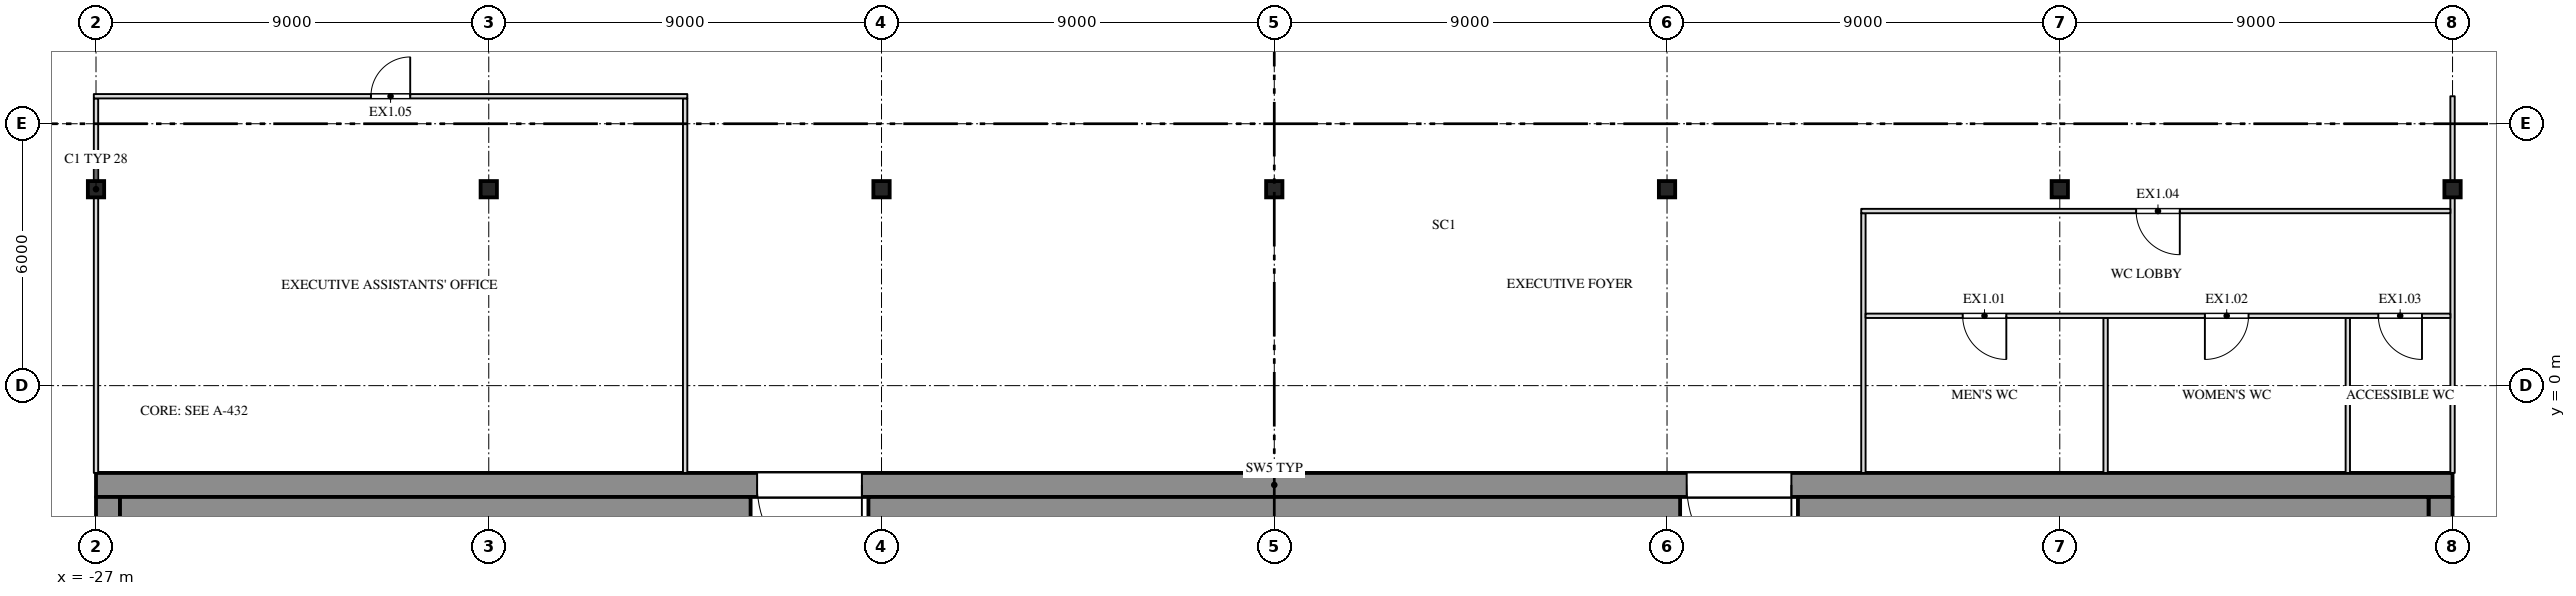
"""IFC4 building model, lengths in metres.
Left out: names, types, materials, properties, quantities, classifications, styles, units other than length and angle.
Written with IfcOpenShell. Run it as: python <this file> out.ifc"""

import sys

from ifc_helpers import new_model, si_unit, direction, frame, frame_2d, origin, origin_2d, place, context, subcontext, project, spatial, rectangle, i_section, extrude, element, fill, save


model = new_model("IFC4")
c1 = context("Model", 3, precision=1e-05, world=origin(), true_north=direction((0.0, 1.0)))
c2 = subcontext(c1, "Body", "Model", "MODEL_VIEW")
j1 = project(units=[si_unit("LENGTHUNIT", "METRE"), si_unit("PLANEANGLEUNIT", "RADIAN")], contexts=[c1])
p1 = place(None, origin())
s1 = spatial("IfcSite", under=j1, at=p1, CompositionType="ELEMENT")
p2 = place(p1, origin())
s2 = spatial("IfcBuilding", under=s1, at=p2, CompositionType="ELEMENT")
p3 = place(p2, frame((0.0, 0.0, 272.5)))
s3 = spatial("IfcBuildingStorey", under=s2, at=p3, CompositionType="ELEMENT", Elevation=272.5)
for number, where, z_axis, x_axis in (
    (1, (-27.0, 4.5, 0.0), (0.0, 0.0, 1.0), (1.0, 0.0, 0.0)),
    (2, (-18.0, 4.5, 0.0), (0.0, 0.0, 1.0), (1.0, 0.0, 0.0)),
    (3, (-9.0, 4.5, 0.0), (0.0, 0.0, 1.0), (1.0, 0.0, 0.0)),
    (4, (0.0, 4.5, 0.0), (0.0, 0.0, 1.0), (1.0, 0.0, 0.0)),
    (5, (9.0, 4.5, 0.0), (0.0, 0.0, 1.0), (1.0, 0.0, 0.0)),
    (6, (18.0, 4.5, 0.0), (0.0, 0.0, 1.0), (1.0, 0.0, 0.0)),
    (7, (27.0, 4.5, 0.0), (0.0, 0.0, 1.0), (1.0, 0.0, 0.0)),
):
    element("IfcColumn", number, at=place(p3, frame(where, z_axis=z_axis, x_axis=x_axis)), inside=s3, PredefinedType="COLUMN", context=c2, shape_type="SweptSolid", body=[
        extrude(i_section(OverallWidth=0.373, OverallDepth=0.373, WebThickness=0.016, FlangeThickness=0.026, at=origin_2d()), origin(), (0.0, 0.0, 1.0), 4.0),
    ])
p4 = place(p3, frame((-27.0, -2.275, 0.0), z_axis=(0.0, 0.0, 1.0), x_axis=(1.0, 0.0, 0.0)))
e8 = element("IfcWall", 8, at=p4, inside=s3, PredefinedType="SHEAR", context=c2, shape_type="SweptSolid", body=[
    extrude(rectangle(XDim=54.0, YDim=0.55, at=frame_2d((27.0, 0.0))), origin(), (0.0, 0.0, 1.0), 3.78),
])
p5 = place(p4, frame((15.15, 0.0, 0.0)))
e9 = element("IfcOpeningElement", 9, at=p5, cuts=e8, PredefinedType="OPENING", context=c2, shape_type="SweptSolid", body=[
    extrude(rectangle(XDim=2.4, YDim=2.1, at=frame_2d((1.2, 1.05))), frame((0.0, 0.287, 0.0), z_axis=(0.0, -1.0, 0.0), x_axis=(1.0, 0.0, 0.0)), (0.0, 0.0, 1.0), 0.574),
])
p6 = place(p4, frame((36.45, 0.0, 0.0)))
e10 = element("IfcOpeningElement", 10, at=p6, cuts=e8, PredefinedType="OPENING", context=c2, shape_type="SweptSolid", body=[
    extrude(rectangle(XDim=2.4, YDim=2.1, at=frame_2d((1.2, 1.05))), frame((0.0, 0.287, 0.0), z_axis=(0.0, -1.0, 0.0), x_axis=(1.0, 0.0, 0.0)), (0.0, 0.0, 1.0), 0.574),
])
p7 = place(p3, frame((-26.725, -13.45, 0.0), z_axis=(0.0, 0.0, 1.0), x_axis=(0.0, 1.0, 0.0)))
e11 = element("IfcWall", 11, at=p7, inside=s3, PredefinedType="SHEAR", context=c2, shape_type="SweptSolid", body=[
    extrude(rectangle(XDim=10.9, YDim=0.55, at=frame_2d((5.45, 0.0))), origin(), (0.0, 0.0, 1.0), 3.78),
])
p8 = place(p7, frame((4.662, 0.0, 0.0)))
e12 = element("IfcOpeningElement", 12, at=p8, cuts=e11, PredefinedType="OPENING", context=c2, shape_type="SweptSolid", body=[
    extrude(rectangle(XDim=2.4, YDim=2.1, at=frame_2d((1.2, 1.05))), frame((0.0, 0.287, 0.0), z_axis=(0.0, -1.0, 0.0), x_axis=(1.0, 0.0, 0.0)), (0.0, 0.0, 1.0), 0.574),
])
p9 = place(p3, frame((26.725, -13.45, 0.0), z_axis=(0.0, 0.0, 1.0), x_axis=(0.0, 1.0, 0.0)))
e13 = element("IfcWall", 13, at=p9, inside=s3, PredefinedType="SHEAR", context=c2, shape_type="SweptSolid", body=[
    extrude(rectangle(XDim=10.9, YDim=0.55, at=frame_2d((5.45, 0.0))), origin(), (0.0, 0.0, 1.0), 3.78),
])
p10 = place(p9, frame((4.662, 0.0, 0.0)))
e14 = element("IfcOpeningElement", 14, at=p10, cuts=e13, PredefinedType="OPENING", context=c2, shape_type="SweptSolid", body=[
    extrude(rectangle(XDim=2.4, YDim=2.1, at=frame_2d((1.2, 1.05))), frame((0.0, 0.287, 0.0), z_axis=(0.0, -1.0, 0.0), x_axis=(1.0, 0.0, 0.0)), (0.0, 0.0, 1.0), 0.574),
])
p11 = place(p3, frame((-26.45, -2.875, 0.0), z_axis=(0.0, 0.0, 1.0), x_axis=(1.0, 0.0, 0.0)))
e15 = element("IfcWall", 15, at=p11, inside=s3, PredefinedType="SHEAR", context=c2, shape_type="SweptSolid", body=[
    extrude(rectangle(XDim=14.45, YDim=0.65, at=frame_2d((7.225, 0.0))), origin(), (0.0, 0.0, 1.0), 3.78),
])
p12 = place(p3, frame((-9.3, -2.875, 0.0), z_axis=(0.0, 0.0, 1.0), x_axis=(1.0, 0.0, 0.0)))
e16 = element("IfcWall", 16, at=p12, inside=s3, PredefinedType="SHEAR", context=c2, shape_type="SweptSolid", body=[
    extrude(rectangle(XDim=18.6, YDim=0.65, at=frame_2d((9.3, 0.0))), origin(), (0.0, 0.0, 1.0), 3.78),
])
p13 = place(p3, frame((12.0, -2.875, 0.0), z_axis=(0.0, 0.0, 1.0), x_axis=(1.0, 0.0, 0.0)))
e17 = element("IfcWall", 17, at=p13, inside=s3, PredefinedType="SHEAR", context=c2, shape_type="SweptSolid", body=[
    extrude(rectangle(XDim=14.45, YDim=0.65, at=frame_2d((7.225, 0.0))), origin(), (0.0, 0.0, 1.0), 3.78),
])
p14 = place(p3, frame((-27.0, -2.0, 0.0), z_axis=(0.0, 0.0, 1.0), x_axis=(0.0, 1.0, 0.0)))
e18 = element("IfcWall", 18, at=p14, inside=s3, PredefinedType="PARTITIONING", context=c2, shape_type="SweptSolid", body=[
    extrude(rectangle(XDim=6.313, YDim=0.1, at=frame_2d((3.157, 0.0))), origin(), (0.0, 0.0, 1.0), 3.247),
])
p15 = place(p3, frame((-27.0, 4.687, 0.0), z_axis=(0.0, 0.0, 1.0), x_axis=(0.0, 1.0, 0.0)))
e19 = element("IfcWall", 19, at=p15, inside=s3, PredefinedType="PARTITIONING", context=c2, shape_type="SweptSolid", body=[
    extrude(rectangle(XDim=1.893, YDim=0.1, at=frame_2d((0.947, 0.0))), origin(), (0.0, 0.0, 1.0), 3.247),
])
p16 = place(p3, frame((-13.5, -2.0, 0.0), z_axis=(0.0, 0.0, 1.0), x_axis=(0.0, 1.0, 0.0)))
e20 = element("IfcWall", 20, at=p16, inside=s3, PredefinedType="PARTITIONING", context=c2, shape_type="SweptSolid", body=[
    extrude(rectangle(XDim=8.58, YDim=0.1, at=frame_2d((4.29, 0.0))), origin(), (0.0, 0.0, 1.0), 3.247),
])
p17 = place(p3, frame((13.5, -2.0, 0.0), z_axis=(0.0, 0.0, 1.0), x_axis=(0.0, 1.0, 0.0)))
e21 = element("IfcWall", 21, at=p17, inside=s3, PredefinedType="PARTITIONING", context=c2, shape_type="SweptSolid", body=[
    extrude(rectangle(XDim=5.95, YDim=0.1, at=frame_2d((2.975, 0.0))), origin(), (0.0, 0.0, 1.0), 3.247),
])
for number, where, z_axis, x_axis in (
    (22, (19.05, -2.0, 0.0), (0.0, 0.0, 1.0), (0.0, 1.0, 0.0)),
    (23, (24.6, -2.0, 0.0), (0.0, 0.0, 1.0), (0.0, 1.0, 0.0)),
):
    element("IfcWall", number, at=place(p3, frame(where, z_axis=z_axis, x_axis=x_axis)), inside=s3, PredefinedType="PARTITIONING", context=c2, shape_type="SweptSolid", body=[
        extrude(rectangle(XDim=3.55, YDim=0.1, at=frame_2d((1.775, 0.0))), origin(), (0.0, 0.0, 1.0), 3.78),
    ])
p18 = place(p3, frame((27.0, -2.0, 0.0), z_axis=(0.0, 0.0, 1.0), x_axis=(0.0, 1.0, 0.0)))
e24 = element("IfcWall", 24, at=p18, inside=s3, PredefinedType="PARTITIONING", context=c2, shape_type="SweptSolid", body=[
    extrude(rectangle(XDim=6.313, YDim=0.1, at=frame_2d((3.157, 0.0))), origin(), (0.0, 0.0, 1.0), 3.247),
])
p19 = place(p3, frame((27.0, 4.687, 0.0), z_axis=(0.0, 0.0, 1.0), x_axis=(0.0, 1.0, 0.0)))
e25 = element("IfcWall", 25, at=p19, inside=s3, PredefinedType="PARTITIONING", context=c2, shape_type="SweptSolid", body=[
    extrude(rectangle(XDim=1.943, YDim=0.1, at=frame_2d((0.972, 0.0))), origin(), (0.0, 0.0, 1.0), 3.247),
])
p20 = place(p3, frame((13.55, 1.6, 0.0), z_axis=(0.0, 0.0, 1.0), x_axis=(1.0, 0.0, 0.0)))
e26 = element("IfcWall", 26, at=p20, inside=s3, PredefinedType="PARTITIONING", context=c2, shape_type="SweptSolid", body=[
    extrude(rectangle(XDim=13.4, YDim=0.1, at=frame_2d((6.7, 0.0))), origin(), (0.0, 0.0, 1.0), 3.78),
])
p21 = place(p20, frame((2.225, 0.0, 0.0)))
e27 = element("IfcOpeningElement", 27, at=p21, cuts=e26, PredefinedType="OPENING", context=c2, shape_type="SweptSolid", body=[
    extrude(rectangle(XDim=1.0, YDim=2.1, at=frame_2d((0.5, 1.05))), frame((0.0, 0.062, 0.0), z_axis=(0.0, -1.0, 0.0), x_axis=(1.0, 0.0, 0.0)), (0.0, 0.0, 1.0), 0.124),
])
p22 = place(p20, frame((7.775, 0.0, 0.0)))
e28 = element("IfcOpeningElement", 28, at=p22, cuts=e26, PredefinedType="OPENING", context=c2, shape_type="SweptSolid", body=[
    extrude(rectangle(XDim=1.0, YDim=2.1, at=frame_2d((0.5, 1.05))), frame((0.0, 0.062, 0.0), z_axis=(0.0, -1.0, 0.0), x_axis=(1.0, 0.0, 0.0)), (0.0, 0.0, 1.0), 0.124),
])
p23 = place(p20, frame((11.75, 0.0, 0.0)))
e29 = element("IfcOpeningElement", 29, at=p23, cuts=e26, PredefinedType="OPENING", context=c2, shape_type="SweptSolid", body=[
    extrude(rectangle(XDim=1.0, YDim=2.1, at=frame_2d((0.5, 1.05))), frame((0.0, 0.062, 0.0), z_axis=(0.0, -1.0, 0.0), x_axis=(1.0, 0.0, 0.0)), (0.0, 0.0, 1.0), 0.124),
])
p24 = place(p3, frame((13.45, 4.0, 0.0), z_axis=(0.0, 0.0, 1.0), x_axis=(1.0, 0.0, 0.0)))
e30 = element("IfcWall", 30, at=p24, inside=s3, PredefinedType="PARTITIONING", context=c2, shape_type="SweptSolid", body=[
    extrude(rectangle(XDim=13.5, YDim=0.1, at=frame_2d((6.75, 0.0))), origin(), (0.0, 0.0, 1.0), 3.78),
])
p25 = place(p24, frame((6.3, 0.0, 0.0)))
e31 = element("IfcOpeningElement", 31, at=p25, cuts=e30, PredefinedType="OPENING", context=c2, shape_type="SweptSolid", body=[
    extrude(rectangle(XDim=1.0, YDim=2.1, at=frame_2d((0.5, 1.05))), frame((0.0, 0.062, 0.0), z_axis=(0.0, -1.0, 0.0), x_axis=(1.0, 0.0, 0.0)), (0.0, 0.0, 1.0), 0.124),
])
p26 = place(p3, frame((-27.05, 6.63, 0.0), z_axis=(0.0, 0.0, 1.0), x_axis=(1.0, 0.0, 0.0)))
e32 = element("IfcWall", 32, at=p26, inside=s3, PredefinedType="PARTITIONING", context=c2, shape_type="SweptSolid", body=[
    extrude(rectangle(XDim=13.6, YDim=0.1, at=frame_2d((6.8, 0.0))), origin(), (0.0, 0.0, 1.0), 3.78),
])
p27 = place(p26, frame((6.35, 0.0, 0.0)))
e33 = element("IfcOpeningElement", 33, at=p27, cuts=e32, PredefinedType="OPENING", context=c2, shape_type="SweptSolid", body=[
    extrude(rectangle(XDim=0.9, YDim=2.1, at=frame_2d((0.45, 1.05))), frame((0.0, 0.062, 0.0), z_axis=(0.0, -1.0, 0.0), x_axis=(1.0, 0.0, 0.0)), (0.0, 0.0, 1.0), 0.124),
])
p28 = place(p21, origin())
e34 = element("IfcDoor", 34, at=p28, inside=s3, OperationType="SINGLE_SWING_LEFT", PredefinedType="DOOR", context=c2, shape_type="SweptSolid", body=[
    extrude(rectangle(XDim=1.0, YDim=2.1, at=frame_2d((0.5, 1.05))), frame((0.0, 0.025, 0.0), z_axis=(0.0, -1.0, 0.0), x_axis=(1.0, 0.0, 0.0)), (0.0, 0.0, 1.0), 0.05),
])
fill(e27, e34)
p29 = place(p22, origin())
e35 = element("IfcDoor", 35, at=p29, inside=s3, OperationType="SINGLE_SWING_RIGHT", PredefinedType="DOOR", context=c2, shape_type="SweptSolid", body=[
    extrude(rectangle(XDim=1.0, YDim=2.1, at=frame_2d((0.5, 1.05))), frame((0.0, 0.025, 0.0), z_axis=(0.0, -1.0, 0.0), x_axis=(1.0, 0.0, 0.0)), (0.0, 0.0, 1.0), 0.05),
])
fill(e28, e35)
p30 = place(p23, origin())
e36 = element("IfcDoor", 36, at=p30, inside=s3, OperationType="SINGLE_SWING_LEFT", PredefinedType="DOOR", context=c2, shape_type="SweptSolid", body=[
    extrude(rectangle(XDim=1.0, YDim=2.1, at=frame_2d((0.5, 1.05))), frame((0.0, 0.025, 0.0), z_axis=(0.0, -1.0, 0.0), x_axis=(1.0, 0.0, 0.0)), (0.0, 0.0, 1.0), 0.05),
])
fill(e29, e36)
p31 = place(p25, origin())
e37 = element("IfcDoor", 37, at=p31, inside=s3, OperationType="SINGLE_SWING_LEFT", PredefinedType="DOOR", context=c2, shape_type="SweptSolid", body=[
    extrude(rectangle(XDim=1.0, YDim=2.1, at=frame_2d((0.5, 1.05))), frame((0.0, 0.025, 0.0), z_axis=(0.0, -1.0, 0.0), x_axis=(1.0, 0.0, 0.0)), (0.0, 0.0, 1.0), 0.05),
])
fill(e31, e37)
p32 = place(p27, origin())
e38 = element("IfcDoor", 38, at=p32, inside=s3, OperationType="SINGLE_SWING_RIGHT", PredefinedType="DOOR", context=c2, shape_type="SweptSolid", body=[
    extrude(rectangle(XDim=0.9, YDim=2.1, at=frame_2d((0.45, 1.05))), frame((0.0, 0.025, 0.0), z_axis=(0.0, -1.0, 0.0), x_axis=(1.0, 0.0, 0.0)), (0.0, 0.0, 1.0), 0.05),
])
fill(e33, e38)
p33 = place(p5, origin())
e39 = element("IfcDoor", 39, at=p33, inside=s3, OperationType="DOUBLE_DOOR_SINGLE_SWING", PredefinedType="DOOR", context=c2, shape_type="SweptSolid", body=[
    extrude(rectangle(XDim=2.4, YDim=2.1, at=frame_2d((1.2, 1.05))), frame((0.0, 0.025, 0.0), z_axis=(0.0, -1.0, 0.0), x_axis=(1.0, 0.0, 0.0)), (0.0, 0.0, 1.0), 0.05),
])
fill(e9, e39)
p34 = place(p6, origin())
e40 = element("IfcDoor", 40, at=p34, inside=s3, OperationType="DOUBLE_DOOR_SINGLE_SWING", PredefinedType="DOOR", context=c2, shape_type="SweptSolid", body=[
    extrude(rectangle(XDim=2.4, YDim=2.1, at=frame_2d((1.2, 1.05))), frame((0.0, 0.025, 0.0), z_axis=(0.0, -1.0, 0.0), x_axis=(1.0, 0.0, 0.0)), (0.0, 0.0, 1.0), 0.05),
])
fill(e10, e40)
save(model, sys.argv[1])
